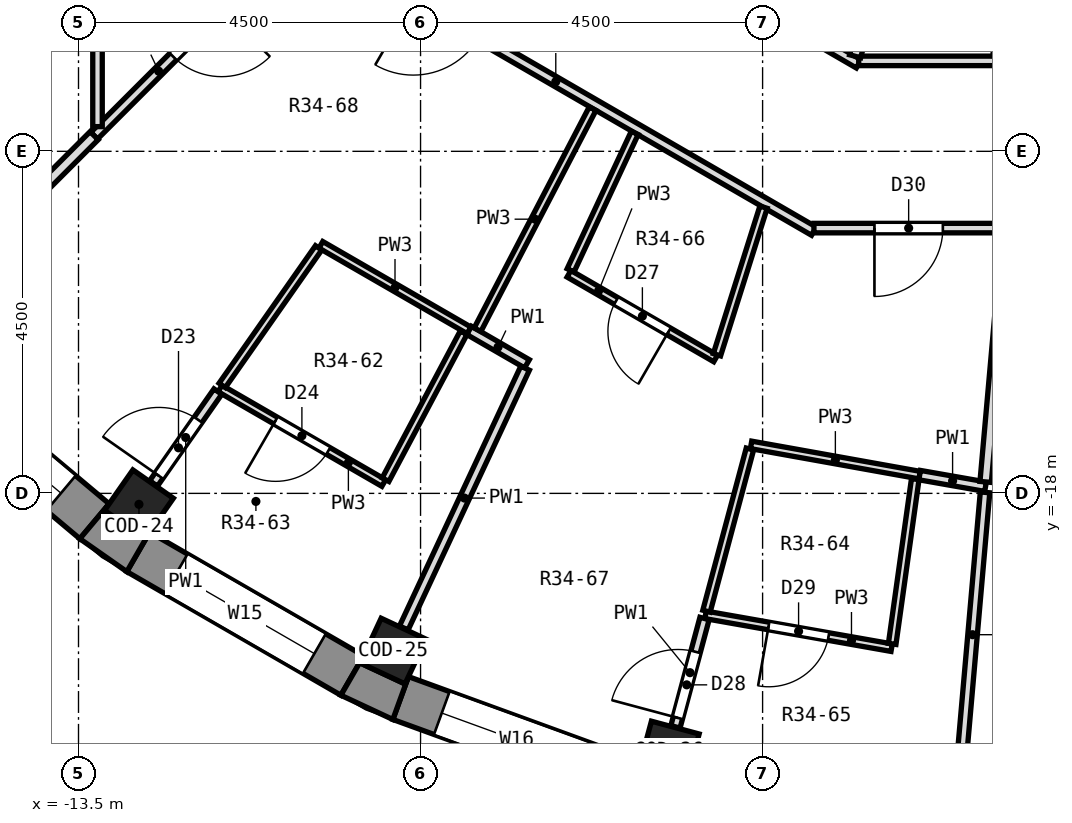
"""IFC4 building model, lengths in metres.
Left out: names, types, materials, properties, quantities, classifications, styles, units other than length and angle.
Written with IfcOpenShell. Run it as: python <this file> out.ifc"""

import sys

from ifc_helpers import new_model, si_unit, direction, frame, frame_2d, origin, origin_2d, place, context, subcontext, project, spatial, polyline, rectangle, outline, extrude, element, fill, save


model = new_model("IFC4")
c1 = context("Model", 3, precision=1e-05, world=origin(), true_north=direction((0.0, 1.0)))
c2 = subcontext(c1, "Body", "Model", "MODEL_VIEW")
j1 = project(units=[si_unit("LENGTHUNIT", "METRE"), si_unit("PLANEANGLEUNIT", "RADIAN")], contexts=[c1])
p1 = place(None, origin())
s1 = spatial("IfcSite", under=j1, at=p1, CompositionType="ELEMENT")
p2 = place(p1, origin())
s2 = spatial("IfcBuilding", under=s1, at=p2, CompositionType="ELEMENT")
p3 = place(p2, frame((0.0, 0.0, 239.6)))
s3 = spatial("IfcBuildingStorey", under=s2, at=p3, CompositionType="ELEMENT", Elevation=239.6)
for number, where, z_axis, x_axis in (
    (1, (-12.705, -18.144, 0.0), (0.0, 0.0, 1.0), (-0.574, -0.819, 0.0)),
    (2, (-9.361, -20.075, 0.0), (0.0, 0.0, 1.0), (-0.423, -0.906, 0.0)),
    (3, (-5.733, -21.395, 0.0), (0.0, 0.0, 1.0), (-0.259, -0.966, 0.0)),
):
    element("IfcColumn", number, at=place(p3, frame(where, z_axis=z_axis, x_axis=x_axis)), inside=s3, PredefinedType="COLUMN", context=c2, shape_type="SweptSolid", body=[
        extrude(rectangle(XDim=0.65, YDim=0.65, at=origin_2d()), origin(), (0.0, 0.0, 1.0), 3.3),
    ])
p4 = place(p3, frame((-15.781, -16.277, 0.0), z_axis=(0.0, 0.0, 1.0), x_axis=(0.766056773982, -0.64277291405, 0.0)))
e4 = element("IfcWall", 4, at=p4, inside=s3, PredefinedType="SOLIDWALL", context=c2, shape_type="SweptSolid", body=[
    extrude(rectangle(XDim=3.252, YDim=0.6, at=frame_2d((1.626, 0.0))), origin(), (0.0, 0.0, 1.0), 2.9),
])
p5 = place(p4, frame((0.576, 0.0, 0.9)))
e5 = element("IfcOpeningElement", 5, at=p5, cuts=e4, PredefinedType="OPENING", context=c2, shape_type="SweptSolid", body=[
    extrude(rectangle(XDim=2.1, YDim=1.8, at=frame_2d((1.05, 0.9))), frame((0.0, 0.312, 0.0), z_axis=(0.0, -1.0, 0.0), x_axis=(1.0, 0.0, 0.0)), (0.0, 0.0, 1.0), 0.624),
])
p6 = place(p3, frame((-12.714, -18.77, 0.0), z_axis=(0.0, 0.0, 1.0), x_axis=(0.866016800201, -0.500014901547, 0.0)))
e6 = element("IfcWall", 6, at=p6, inside=s3, PredefinedType="SOLIDWALL", context=c2, shape_type="SweptSolid", body=[
    extrude(rectangle(XDim=3.252, YDim=0.6, at=frame_2d((1.626, 0.0))), origin(), (0.0, 0.0, 1.0), 2.9),
])
p7 = place(p6, frame((0.576, 0.0, 0.9)))
e7 = element("IfcOpeningElement", 7, at=p7, cuts=e6, PredefinedType="OPENING", context=c2, shape_type="SweptSolid", body=[
    extrude(rectangle(XDim=2.1, YDim=1.8, at=frame_2d((1.05, 0.9))), frame((0.0, 0.312, 0.0), z_axis=(0.0, -1.0, 0.0), x_axis=(1.0, 0.0, 0.0)), (0.0, 0.0, 1.0), 0.624),
])
p8 = place(p3, frame((-9.262, -20.693, 0.0), z_axis=(0.0, 0.0, 1.0), x_axis=(0.939679383794, -0.342056509473, 0.0)))
e8 = element("IfcWall", 8, at=p8, inside=s3, PredefinedType="SOLIDWALL", context=c2, shape_type="SweptSolid", body=[
    extrude(rectangle(XDim=3.252, YDim=0.6, at=frame_2d((1.626, 0.0))), origin(), (0.0, 0.0, 1.0), 2.9),
])
p9 = place(p8, frame((0.576, 0.0, 0.9)))
e9 = element("IfcOpeningElement", 9, at=p9, cuts=e8, PredefinedType="OPENING", context=c2, shape_type="SweptSolid", body=[
    extrude(rectangle(XDim=2.1, YDim=1.8, at=frame_2d((1.05, 0.9))), frame((0.0, 0.312, 0.0), z_axis=(0.0, -1.0, 0.0), x_axis=(1.0, 0.0, 0.0)), (0.0, 0.0, 1.0), 0.624),
])
p10 = place(p3, origin())
e10 = element("IfcWall", 10, at=p10, inside=s3, PredefinedType="SOLIDWALL", context=c2, shape_type="SweptSolid", body=[
    extrude(outline(polyline([(-12.864, -19.03), (-12.564, -18.51), (-12.625, -18.597), (-13.157, -18.224), (-13.097, -18.137), (-13.482, -18.597), (-12.864, -19.03)])), origin(), (0.0, 0.0, 1.0), 2.9),
])
p11 = place(p3, origin())
e11 = element("IfcWall", 11, at=p11, inside=s3, PredefinedType="SOLIDWALL", context=c2, shape_type="SweptSolid", body=[
    extrude(outline(polyline([(-10.048, -20.656), (-9.364, -20.975), (-9.159, -20.411), (-9.204, -20.507), (-9.793, -20.232), (-9.748, -20.136), (-10.048, -20.656)])), origin(), (0.0, 0.0, 1.0), 2.9),
])
p12 = place(p3, frame((-10.618, -10.615, 0.0), z_axis=(0.0, 0.0, 1.0), x_axis=(0.865323364785, -0.501214000561, 0.0)))
e12 = element("IfcWall", 12, at=p12, inside=s3, PredefinedType="PARTITIONING", context=c2, shape_type="SweptSolid", body=[
    extrude(rectangle(XDim=7.851, YDim=0.125, at=frame_2d((3.926, 0.0))), origin(), (0.0, 0.0, 1.0), 2.9),
])
p13 = place(p12, frame((1.76, 0.0, 0.0)))
e13 = element("IfcOpeningElement", 13, at=p13, cuts=e12, PredefinedType="OPENING", context=c2, shape_type="SweptSolid", body=[
    extrude(rectangle(XDim=1.0, YDim=2.1, at=frame_2d((0.5, 1.05))), frame((0.0, 0.074, 0.0), z_axis=(0.0, -1.0, 0.0), x_axis=(1.0, 0.0, 0.0)), (0.0, 0.0, 1.0), 0.149),
])
p14 = place(p3, frame((-8.953, -9.036, 0.0), z_axis=(0.0, 0.0, 1.0), x_axis=(0.865185064951, -0.501452693068, 0.0)))
e14 = element("IfcWall", 14, at=p14, inside=s3, PredefinedType="PARTITIONING", context=c2, shape_type="SweptSolid", body=[
    extrude(rectangle(XDim=6.609, YDim=0.125, at=frame_2d((3.304, 0.0))), origin(), (0.0, 0.0, 1.0), 2.9),
])
p15 = place(p14, frame((2.685, 0.0, 0.0)))
e15 = element("IfcOpeningElement", 15, at=p15, cuts=e14, PredefinedType="OPENING", context=c2, shape_type="SweptSolid", body=[
    extrude(rectangle(XDim=1.0, YDim=2.1, at=frame_2d((0.5, 1.05))), frame((0.0, 0.074, 0.0), z_axis=(0.0, -1.0, 0.0), x_axis=(1.0, 0.0, 0.0)), (0.0, 0.0, 1.0), 0.149),
])
p16 = place(p3, frame((-11.638, -16.62, 0.0), z_axis=(0.0, 0.0, 1.0), x_axis=(0.865981260576, -0.500076450486, 0.0)))
e16 = element("IfcWall", 16, at=p16, inside=s3, PredefinedType="PARTITIONING", context=c2, shape_type="SweptSolid", body=[
    extrude(rectangle(XDim=2.487, YDim=0.1, at=frame_2d((1.244, 0.0))), origin(), (0.0, 0.0, 1.0), 2.9),
])
p17 = place(p16, frame((0.844, 0.0, 0.0)))
e17 = element("IfcOpeningElement", 17, at=p17, cuts=e16, PredefinedType="OPENING", context=c2, shape_type="SweptSolid", body=[
    extrude(rectangle(XDim=0.8, YDim=2.1, at=frame_2d((0.4, 1.05))), frame((0.0, 0.062, 0.0), z_axis=(0.0, -1.0, 0.0), x_axis=(1.0, 0.0, 0.0)), (0.0, 0.0, 1.0), 0.124),
])
p18 = place(p3, frame((-10.311, -14.73, 0.0), z_axis=(0.0, 0.0, 1.0), x_axis=(0.866073680794, -0.499916372443, 0.0)))
e18 = element("IfcWall", 18, at=p18, inside=s3, PredefinedType="PARTITIONING", context=c2, shape_type="SweptSolid", body=[
    extrude(rectangle(XDim=2.252, YDim=0.1, at=frame_2d((1.126, 0.0))), origin(), (0.0, 0.0, 1.0), 2.9),
])
p19 = place(p3, frame((-8.361, -15.856, 0.0), z_axis=(0.0, 0.0, 1.0), x_axis=(0.865838315616, -0.500323906295, 0.0)))
e19 = element("IfcWall", 19, at=p19, inside=s3, PredefinedType="PARTITIONING", context=c2, shape_type="SweptSolid", body=[
    extrude(rectangle(XDim=0.878, YDim=0.125, at=frame_2d((0.439, 0.0))), origin(), (0.0, 0.0, 1.0), 2.9),
])
p20 = place(p3, frame((-7.047, -15.111, 0.0), z_axis=(0.0, 0.0, 1.0), x_axis=(0.866015874633, -0.500016504612, 0.0)))
e20 = element("IfcWall", 20, at=p20, inside=s3, PredefinedType="PARTITIONING", context=c2, shape_type="SweptSolid", body=[
    extrude(rectangle(XDim=2.228, YDim=0.1, at=frame_2d((1.114, 0.0))), origin(), (0.0, 0.0, 1.0), 2.9),
])
p21 = place(p20, frame((0.715, 0.0, 0.0)))
e21 = element("IfcOpeningElement", 21, at=p21, cuts=e20, PredefinedType="OPENING", context=c2, shape_type="SweptSolid", body=[
    extrude(rectangle(XDim=0.8, YDim=2.1, at=frame_2d((0.4, 1.05))), frame((0.0, 0.062, 0.0), z_axis=(0.0, -1.0, 0.0), x_axis=(1.0, 0.0, 0.0)), (0.0, 0.0, 1.0), 0.124),
])
p22 = place(p3, frame((-4.652, -17.362, 0.0), z_axis=(0.0, 0.0, 1.0), x_axis=(0.984302107819, -0.176491814379, 0.0)))
e22 = element("IfcWall", 22, at=p22, inside=s3, PredefinedType="PARTITIONING", context=c2, shape_type="SweptSolid", body=[
    extrude(rectangle(XDim=2.253, YDim=0.1, at=frame_2d((1.127, 0.0))), origin(), (0.0, 0.0, 1.0), 2.9),
])
p23 = place(p3, frame((-5.251, -19.598, 0.0), z_axis=(0.0, 0.0, 1.0), x_axis=(0.984786523671, -0.17376853224, 0.0)))
e23 = element("IfcWall", 23, at=p23, inside=s3, PredefinedType="PARTITIONING", context=c2, shape_type="SweptSolid", body=[
    extrude(rectangle(XDim=2.487, YDim=0.1, at=frame_2d((1.243, 0.0))), origin(), (0.0, 0.0, 1.0), 2.9),
])
p24 = place(p23, frame((0.844, 0.0, 0.0)))
e24 = element("IfcOpeningElement", 24, at=p24, cuts=e23, PredefinedType="OPENING", context=c2, shape_type="SweptSolid", body=[
    extrude(rectangle(XDim=0.8, YDim=2.1, at=frame_2d((0.4, 1.05))), frame((0.0, 0.062, 0.0), z_axis=(0.0, -1.0, 0.0), x_axis=(1.0, 0.0, 0.0)), (0.0, 0.0, 1.0), 0.124),
])
p25 = place(p3, frame((-2.434, -17.76, 0.0), z_axis=(0.0, 0.0, 1.0), x_axis=(0.984908951539, -0.173073271124, 0.0)))
e25 = element("IfcWall", 25, at=p25, inside=s3, PredefinedType="PARTITIONING", context=c2, shape_type="SweptSolid", body=[
    extrude(rectangle(XDim=0.88, YDim=0.125, at=frame_2d((0.44, 0.0))), origin(), (0.0, 0.0, 1.0), 2.9),
])
p26 = place(p3, frame((-3.824, -14.51, 0.0), z_axis=(0.0, 0.0, 1.0), x_axis=(1.0, 0.0, 0.0)))
e26 = element("IfcWall", 26, at=p26, inside=s3, PredefinedType="PARTITIONING", context=c2, shape_type="SweptSolid", body=[
    extrude(rectangle(XDim=7.785, YDim=0.125, at=frame_2d((3.892, 0.0))), origin(), (0.0, 0.0, 1.0), 2.9),
])
p27 = place(p26, frame((0.796, 0.0, 0.0)))
e27 = element("IfcOpeningElement", 27, at=p27, cuts=e26, PredefinedType="OPENING", context=c2, shape_type="SweptSolid", body=[
    extrude(rectangle(XDim=0.9, YDim=2.1, at=frame_2d((0.45, 1.05))), frame((0.0, 0.074, 0.0), z_axis=(0.0, -1.0, 0.0), x_axis=(1.0, 0.0, 0.0)), (0.0, 0.0, 1.0), 0.149),
])
p28 = place(p26, frame((4.634, 0.0, 0.0)))
e28 = element("IfcOpeningElement", 28, at=p28, cuts=e26, PredefinedType="OPENING", context=c2, shape_type="SweptSolid", body=[
    extrude(rectangle(XDim=1.0, YDim=2.1, at=frame_2d((0.5, 1.05))), frame((0.0, 0.074, 0.0), z_axis=(0.0, -1.0, 0.0), x_axis=(1.0, 0.0, 0.0)), (0.0, 0.0, 1.0), 0.149),
])
p29 = place(p3, frame((-3.236, -12.31, 0.0), z_axis=(0.0, 0.0, 1.0), x_axis=(1.0, 0.0, 0.0)))
e29 = element("IfcWall", 29, at=p29, inside=s3, PredefinedType="PARTITIONING", context=c2, shape_type="SweptSolid", body=[
    extrude(rectangle(XDim=6.62, YDim=0.125, at=frame_2d((3.31, 0.0))), origin(), (0.0, 0.0, 1.0), 2.9),
])
p30 = place(p29, frame((2.787, 0.0, 0.0)))
e30 = element("IfcOpeningElement", 30, at=p30, cuts=e29, PredefinedType="OPENING", context=c2, shape_type="SweptSolid", body=[
    extrude(rectangle(XDim=1.0, YDim=2.1, at=frame_2d((0.5, 1.05))), frame((0.0, 0.074, 0.0), z_axis=(0.0, -1.0, 0.0), x_axis=(1.0, 0.0, 0.0)), (0.0, 0.0, 1.0), 0.149),
])
p31 = place(p3, frame((-13.294, -13.294, 0.0), z_axis=(0.0, 0.0, 1.0), x_axis=(0.707106781187, 0.707106781187, 0.0)))
e31 = element("IfcWall", 31, at=p31, inside=s3, PredefinedType="PARTITIONING", context=c2, shape_type="SweptSolid", body=[
    extrude(rectangle(XDim=3.717, YDim=0.125, at=frame_2d((1.858, 0.0))), origin(), (0.0, 0.0, 1.0), 2.9),
])
p32 = place(p31, frame((1.471, 0.0, 0.0)))
e32 = element("IfcOpeningElement", 32, at=p32, cuts=e31, PredefinedType="OPENING", context=c2, shape_type="SweptSolid", body=[
    extrude(rectangle(XDim=0.9, YDim=2.1, at=frame_2d((0.45, 1.05))), frame((0.0, 0.074, 0.0), z_axis=(0.0, -1.0, 0.0), x_axis=(1.0, 0.0, 0.0)), (0.0, 0.0, 1.0), 0.149),
])
p33 = place(p3, frame((-15.426, -15.426, 0.0), z_axis=(0.0, 0.0, 1.0), x_axis=(0.707106781187, 0.707106781187, 0.0)))
e33 = element("IfcWall", 33, at=p33, inside=s3, PredefinedType="PARTITIONING", context=c2, shape_type="SweptSolid", body=[
    extrude(rectangle(XDim=3.014, YDim=0.15, at=frame_2d((1.507, 0.0))), origin(), (0.0, 0.0, 1.0), 2.9),
])
p34 = place(p3, frame((-11.609, -16.579, 0.0), z_axis=(0.0, 0.0, 1.0), x_axis=(0.574033341126, 0.818831926146, 0.0)))
e34 = element("IfcWall", 34, at=p34, inside=s3, PredefinedType="PARTITIONING", context=c2, shape_type="SweptSolid", body=[
    extrude(rectangle(XDim=2.209, YDim=0.1, at=frame_2d((1.104, 0.0))), origin(), (0.0, 0.0, 1.0), 2.9),
])
p35 = place(p3, frame((-12.513, -17.87, 0.0), z_axis=(0.0, 0.0, 1.0), x_axis=(0.573384599987, 0.819286336086, 0.0)))
e35 = element("IfcWall", 35, at=p35, inside=s3, PredefinedType="PARTITIONING", context=c2, shape_type="SweptSolid", body=[
    extrude(rectangle(XDim=1.475, YDim=0.125, at=frame_2d((0.738, 0.0))), origin(), (0.0, 0.0, 1.0), 2.9),
])
p36 = place(p35, frame((0.123, 0.0, 0.0)))
e36 = element("IfcOpeningElement", 36, at=p36, cuts=e35, PredefinedType="OPENING", context=c2, shape_type="SweptSolid", body=[
    extrude(rectangle(XDim=0.9, YDim=2.1, at=frame_2d((0.45, 1.05))), frame((0.0, 0.074, 0.0), z_axis=(0.0, -1.0, 0.0), x_axis=(1.0, 0.0, 0.0)), (0.0, 0.0, 1.0), 0.149),
])
p37 = place(p3, frame((-9.46, -17.82, 0.0), z_axis=(0.0, 0.0, 1.0), x_axis=(0.469111743442, 0.883138818174, 0.0)))
e37 = element("IfcWall", 37, at=p37, inside=s3, PredefinedType="PARTITIONING", context=c2, shape_type="SweptSolid", body=[
    extrude(rectangle(XDim=2.189, YDim=0.1, at=frame_2d((1.095, 0.0))), origin(), (0.0, 0.0, 1.0), 2.9),
])
p38 = place(p3, frame((-8.25, -15.847, 0.0), z_axis=(0.0, 0.0, 1.0), x_axis=(0.461751333764, 0.887009416955, 0.0)))
e38 = element("IfcWall", 38, at=p38, inside=s3, PredefinedType="PARTITIONING", context=c2, shape_type="SweptSolid", body=[
    extrude(rectangle(XDim=3.278, YDim=0.1, at=frame_2d((1.639, 0.0))), origin(), (0.0, 0.0, 1.0), 2.9),
])
p39 = place(p3, frame((-9.22, -19.771, 0.0), z_axis=(0.0, 0.0, 1.0), x_axis=(0.422998854506, 0.906130216408, 0.0)))
e39 = element("IfcWall", 39, at=p39, inside=s3, PredefinedType="PARTITIONING", context=c2, shape_type="SweptSolid", body=[
    extrude(rectangle(XDim=3.772, YDim=0.125, at=frame_2d((1.886, 0.0))), origin(), (0.0, 0.0, 1.0), 2.9),
])
p40 = place(p3, frame((-7.026, -15.066, 0.0), z_axis=(0.0, 0.0, 1.0), x_axis=(0.422771582019, 0.906236276827, 0.0)))
e40 = element("IfcWall", 40, at=p40, inside=s3, PredefinedType="PARTITIONING", context=c2, shape_type="SweptSolid", body=[
    extrude(rectangle(XDim=1.995, YDim=0.1, at=frame_2d((0.998, 0.0))), origin(), (0.0, 0.0, 1.0), 2.9),
])
p41 = place(p3, frame((-5.1, -16.176, 0.0), z_axis=(0.0, 0.0, 1.0), x_axis=(0.300861627233, 0.953667804457, 0.0)))
e41 = element("IfcWall", 41, at=p41, inside=s3, PredefinedType="PARTITIONING", context=c2, shape_type="SweptSolid", body=[
    extrude(rectangle(XDim=2.036, YDim=0.1, at=frame_2d((1.018, 0.0))), origin(), (0.0, 0.0, 1.0), 2.9),
])
p42 = place(p3, frame((-5.646, -21.072, 0.0), z_axis=(0.0, 0.0, 1.0), x_axis=(0.259237722608, 0.965813544726, 0.0)))
e42 = element("IfcWall", 42, at=p42, inside=s3, PredefinedType="PARTITIONING", context=c2, shape_type="SweptSolid", body=[
    extrude(rectangle(XDim=1.476, YDim=0.125, at=frame_2d((0.738, 0.0))), origin(), (0.0, 0.0, 1.0), 2.9),
])
p43 = place(p42, frame((0.122, 0.0, 0.0)))
e43 = element("IfcOpeningElement", 43, at=p43, cuts=e42, PredefinedType="OPENING", context=c2, shape_type="SweptSolid", body=[
    extrude(rectangle(XDim=0.9, YDim=2.1, at=frame_2d((0.45, 1.05))), frame((0.0, 0.074, 0.0), z_axis=(0.0, -1.0, 0.0), x_axis=(1.0, 0.0, 0.0)), (0.0, 0.0, 1.0), 0.149),
])
p44 = place(p3, frame((-5.238, -19.55, 0.0), z_axis=(0.0, 0.0, 1.0), x_axis=(0.258653207269, 0.965970247145, 0.0)))
e44 = element("IfcWall", 44, at=p44, inside=s3, PredefinedType="PARTITIONING", context=c2, shape_type="SweptSolid", body=[
    extrude(rectangle(XDim=2.209, YDim=0.1, at=frame_2d((1.104, 0.0))), origin(), (0.0, 0.0, 1.0), 2.9),
])
p45 = place(p3, frame((-3.282, -12.25, 0.0), z_axis=(0.0, 0.0, 1.0), x_axis=(0.258727295272, 0.965950405912, 0.0)))
e45 = element("IfcWall", 45, at=p45, inside=s3, PredefinedType="PARTITIONING", context=c2, shape_type="SweptSolid", body=[
    extrude(rectangle(XDim=3.24, YDim=0.15, at=frame_2d((1.62, 0.0))), origin(), (0.0, 0.0, 1.0), 2.9),
])
p46 = place(p3, frame((-2.795, -19.98, 0.0), z_axis=(0.0, 0.0, 1.0), x_axis=(0.138656596978, 0.990340521293, 0.0)))
e46 = element("IfcWall", 46, at=p46, inside=s3, PredefinedType="PARTITIONING", context=c2, shape_type="SweptSolid", body=[
    extrude(rectangle(XDim=2.189, YDim=0.1, at=frame_2d((1.094, 0.0))), origin(), (0.0, 0.0, 1.0), 2.9),
])
p47 = place(p3, frame((-1.565, -17.849, 0.0), z_axis=(0.0, 0.0, 1.0), x_axis=(0.088454711903, 0.996080199553, 0.0)))
e47 = element("IfcWall", 47, at=p47, inside=s3, PredefinedType="PARTITIONING", context=c2, shape_type="SweptSolid", body=[
    extrude(rectangle(XDim=3.29, YDim=0.15, at=frame_2d((1.645, 0.0))), origin(), (0.0, 0.0, 1.0), 2.9),
])
p48 = place(p3, frame((-1.902, -21.732, 0.0), z_axis=(0.0, 0.0, 1.0), x_axis=(0.087279731719, 0.996183842687, 0.0)))
e48 = element("IfcWall", 48, at=p48, inside=s3, PredefinedType="PARTITIONING", context=c2, shape_type="SweptSolid", body=[
    extrude(rectangle(XDim=3.76, YDim=0.125, at=frame_2d((1.88, 0.0))), origin(), (0.0, 0.0, 1.0), 2.9),
])
p49 = place(p3, frame((-13.25, -13.175, 0.0), z_axis=(0.0, 0.0, 1.0), x_axis=(0.0, 1.0, 0.0)))
e49 = element("IfcWall", 49, at=p49, inside=s3, PredefinedType="PARTITIONING", context=c2, shape_type="SweptSolid", body=[
    extrude(rectangle(XDim=3.925, YDim=0.125, at=frame_2d((1.962, 0.0))), origin(), (0.0, 0.0, 1.0), 2.9),
])
p50 = place(p49, frame((1.475, 0.0, 0.0)))
e50 = element("IfcOpeningElement", 50, at=p50, cuts=e49, PredefinedType="OPENING", context=c2, shape_type="SweptSolid", body=[
    extrude(rectangle(XDim=0.9, YDim=2.1, at=frame_2d((0.45, 1.05))), frame((0.0, 0.074, 0.0), z_axis=(0.0, -1.0, 0.0), x_axis=(1.0, 0.0, 0.0)), (0.0, 0.0, 1.0), 0.149),
])
p51 = place(p5, origin())
e51 = element("IfcWindow", 51, at=p51, inside=s3, PartitioningType="SINGLE_PANEL", PredefinedType="WINDOW", context=c2, shape_type="SweptSolid", body=[
    extrude(rectangle(XDim=2.1, YDim=1.8, at=frame_2d((1.05, 0.9))), frame((0.0, 0.18, 0.0), z_axis=(0.0, -1.0, 0.0), x_axis=(1.0, 0.0, 0.0)), (0.0, 0.0, 1.0), 0.06),
])
fill(e5, e51)
p52 = place(p7, origin())
e52 = element("IfcWindow", 52, at=p52, inside=s3, PartitioningType="SINGLE_PANEL", PredefinedType="WINDOW", context=c2, shape_type="SweptSolid", body=[
    extrude(rectangle(XDim=2.1, YDim=1.8, at=frame_2d((1.05, 0.9))), frame((0.0, 0.18, 0.0), z_axis=(0.0, -1.0, 0.0), x_axis=(1.0, 0.0, 0.0)), (0.0, 0.0, 1.0), 0.06),
])
fill(e7, e52)
p53 = place(p9, origin())
e53 = element("IfcWindow", 53, at=p53, inside=s3, PartitioningType="SINGLE_PANEL", PredefinedType="WINDOW", context=c2, shape_type="SweptSolid", body=[
    extrude(rectangle(XDim=2.1, YDim=1.8, at=frame_2d((1.05, 0.9))), frame((0.0, 0.18, 0.0), z_axis=(0.0, -1.0, 0.0), x_axis=(1.0, 0.0, 0.0)), (0.0, 0.0, 1.0), 0.06),
])
fill(e9, e53)
p54 = place(p32, frame((0.9, 0.0, 0.0), z_axis=(0.0, 0.0, 1.0), x_axis=(-1.0, 0.0, 0.0)))
e54 = element("IfcDoor", 54, at=p54, inside=s3, OperationType="SINGLE_SWING_LEFT", PredefinedType="DOOR", context=c2, shape_type="SweptSolid", body=[
    extrude(rectangle(XDim=0.9, YDim=2.1, at=frame_2d((0.45, 1.05))), frame((0.0, 0.025, 0.0), z_axis=(0.0, -1.0, 0.0), x_axis=(1.0, 0.0, 0.0)), (0.0, 0.0, 1.0), 0.05),
])
fill(e32, e54)
p55 = place(p36, origin())
e55 = element("IfcDoor", 55, at=p55, inside=s3, OperationType="SINGLE_SWING_LEFT", PredefinedType="DOOR", context=c2, shape_type="SweptSolid", body=[
    extrude(rectangle(XDim=0.9, YDim=2.1, at=frame_2d((0.45, 1.05))), frame((0.0, 0.025, 0.0), z_axis=(0.0, -1.0, 0.0), x_axis=(1.0, 0.0, 0.0)), (0.0, 0.0, 1.0), 0.05),
])
fill(e36, e55)
p56 = place(p17, frame((0.8, 0.0, 0.0), z_axis=(0.0, 0.0, 1.0), x_axis=(-1.0, 0.0, 0.0)))
e56 = element("IfcDoor", 56, at=p56, inside=s3, OperationType="SINGLE_SWING_RIGHT", PredefinedType="DOOR", context=c2, shape_type="SweptSolid", body=[
    extrude(rectangle(XDim=0.8, YDim=2.1, at=frame_2d((0.4, 1.05))), frame((0.0, 0.025, 0.0), z_axis=(0.0, -1.0, 0.0), x_axis=(1.0, 0.0, 0.0)), (0.0, 0.0, 1.0), 0.05),
])
fill(e17, e56)
p57 = place(p21, frame((0.8, 0.0, 0.0), z_axis=(0.0, 0.0, 1.0), x_axis=(-1.0, 0.0, 0.0)))
e57 = element("IfcDoor", 57, at=p57, inside=s3, OperationType="SINGLE_SWING_LEFT", PredefinedType="DOOR", context=c2, shape_type="SweptSolid", body=[
    extrude(rectangle(XDim=0.8, YDim=2.1, at=frame_2d((0.4, 1.05))), frame((0.0, 0.025, 0.0), z_axis=(0.0, -1.0, 0.0), x_axis=(1.0, 0.0, 0.0)), (0.0, 0.0, 1.0), 0.05),
])
fill(e21, e57)
p58 = place(p43, origin())
e58 = element("IfcDoor", 58, at=p58, inside=s3, OperationType="SINGLE_SWING_LEFT", PredefinedType="DOOR", context=c2, shape_type="SweptSolid", body=[
    extrude(rectangle(XDim=0.9, YDim=2.1, at=frame_2d((0.45, 1.05))), frame((0.0, 0.025, 0.0), z_axis=(0.0, -1.0, 0.0), x_axis=(1.0, 0.0, 0.0)), (0.0, 0.0, 1.0), 0.05),
])
fill(e43, e58)
p59 = place(p24, frame((0.8, 0.0, 0.0), z_axis=(0.0, 0.0, 1.0), x_axis=(-1.0, 0.0, 0.0)))
e59 = element("IfcDoor", 59, at=p59, inside=s3, OperationType="SINGLE_SWING_RIGHT", PredefinedType="DOOR", context=c2, shape_type="SweptSolid", body=[
    extrude(rectangle(XDim=0.8, YDim=2.1, at=frame_2d((0.4, 1.05))), frame((0.0, 0.025, 0.0), z_axis=(0.0, -1.0, 0.0), x_axis=(1.0, 0.0, 0.0)), (0.0, 0.0, 1.0), 0.05),
])
fill(e24, e59)
p60 = place(p27, frame((0.9, 0.0, 0.0), z_axis=(0.0, 0.0, 1.0), x_axis=(-1.0, 0.0, 0.0)))
e60 = element("IfcDoor", 60, at=p60, inside=s3, OperationType="SINGLE_SWING_RIGHT", PredefinedType="DOOR", context=c2, shape_type="SweptSolid", body=[
    extrude(rectangle(XDim=0.9, YDim=2.1, at=frame_2d((0.45, 1.05))), frame((0.0, 0.025, 0.0), z_axis=(0.0, -1.0, 0.0), x_axis=(1.0, 0.0, 0.0)), (0.0, 0.0, 1.0), 0.05),
])
fill(e27, e60)
save(model, sys.argv[1])
